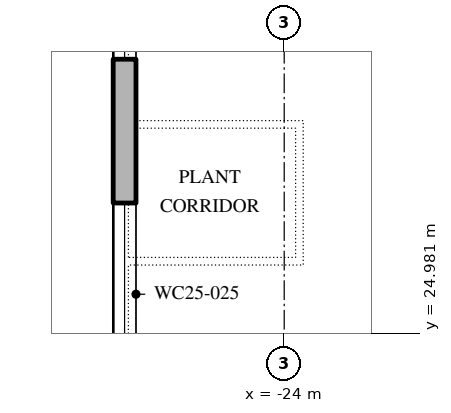
"""IFC4 building model, lengths in metres.
Left out: names, types, materials, properties, quantities, classifications, styles, units other than length and angle.
Written with IfcOpenShell. Run it as: python <this file> out.ifc"""

import sys

from ifc_helpers import new_model, si_unit, direction, frame, frame_2d, origin, place, context, subcontext, project, spatial, polyline, rectangle, outline, extrude, element, fill, save


model = new_model("IFC4")
c1 = context("Model", 3, precision=1e-05, world=origin(), true_north=direction((0.0, 1.0)))
c2 = subcontext(c1, "Body", "Model", "MODEL_VIEW")
j1 = project(units=[si_unit("LENGTHUNIT", "METRE"), si_unit("PLANEANGLEUNIT", "RADIAN")], contexts=[c1])
p1 = place(None, origin())
s1 = spatial("IfcSite", under=j1, at=p1, CompositionType="ELEMENT")
p2 = place(p1, origin())
s2 = spatial("IfcBuilding", under=s1, at=p2, CompositionType="ELEMENT")
p3 = place(p2, frame((0.0, 0.0, 373.2)))
s3 = spatial("IfcBuildingStorey", under=s2, at=p3, CompositionType="ELEMENT", Elevation=373.2)
p4 = place(p3, frame((-26.1, 31.933, 0.0), z_axis=(0.0, 0.0, 1.0), x_axis=(0.0, -1.0, 0.0)))
e1 = element("IfcWall", 1, at=p4, inside=s3, PredefinedType="STANDARD", context=c2, shape_type="SweptSolid", body=[
    extrude(rectangle(XDim=8.583, YDim=0.3, at=frame_2d((4.292, 0.0))), origin(), (0.0, 0.0, 1.0), 4.0),
])
p5 = place(p4, frame((0.946, 0.0, 0.8)))
e2 = element("IfcOpeningElement", 2, at=p5, cuts=e1, PredefinedType="OPENING", context=c2, shape_type="SweptSolid", body=[
    extrude(outline(polyline([(0.0, 0.0), (2.4, 0.0), (2.4, 1.25), (2.377, 1.488), (2.31, 1.717), (2.2, 1.929), (2.051, 2.116), (1.87, 2.272), (1.663, 2.391), (1.437, 2.468), (1.2, 2.5), (0.963, 2.468), (0.737, 2.391), (0.53, 2.272), (0.349, 2.116), (0.2, 1.929), (0.09, 1.717), (0.023, 1.488), (0.0, 1.25), (0.0, 0.0)])), frame((0.0, 0.16, 0.0), z_axis=(0.0, -1.0, 0.0), x_axis=(1.0, 0.0, 0.0)), (0.0, 0.0, 1.0), 0.32),
])
p6 = place(p4, frame((5.238, 0.0, 0.8)))
e3 = element("IfcOpeningElement", 3, at=p6, cuts=e1, PredefinedType="OPENING", context=c2, shape_type="SweptSolid", body=[
    extrude(outline(polyline([(0.0, 0.0), (2.4, 0.0), (2.4, 1.25), (2.377, 1.488), (2.31, 1.717), (2.2, 1.929), (2.051, 2.116), (1.87, 2.272), (1.663, 2.391), (1.437, 2.468), (1.2, 2.5), (0.963, 2.468), (0.737, 2.391), (0.53, 2.272), (0.349, 2.116), (0.2, 1.929), (0.09, 1.717), (0.023, 1.488), (0.0, 1.25), (0.0, 0.0)])), frame((0.0, 0.16, 0.0), z_axis=(0.0, -1.0, 0.0), x_axis=(1.0, 0.0, 0.0)), (0.0, 0.0, 1.0), 0.32),
])
p7 = place(p5, origin())
e4 = element("IfcWindow", 4, at=p7, inside=s3, PartitioningType="DOUBLE_PANEL_VERTICAL", PredefinedType="WINDOW", context=c2, shape_type="SweptSolid", body=[
    extrude(outline(polyline([(0.0, 0.0), (2.4, 0.0), (2.4, 1.25), (2.377, 1.488), (2.31, 1.717), (2.2, 1.929), (2.051, 2.116), (1.87, 2.272), (1.663, 2.391), (1.437, 2.468), (1.2, 2.5), (0.963, 2.468), (0.737, 2.391), (0.53, 2.272), (0.349, 2.116), (0.2, 1.929), (0.09, 1.717), (0.023, 1.488), (0.0, 1.25), (0.0, 0.0)])), frame((0.0, 0.03, 0.0), z_axis=(0.0, -1.0, 0.0), x_axis=(1.0, 0.0, 0.0)), (0.0, 0.0, 1.0), 0.06),
])
fill(e2, e4)
p8 = place(p6, origin())
e5 = element("IfcWindow", 5, at=p8, inside=s3, PartitioningType="DOUBLE_PANEL_VERTICAL", PredefinedType="WINDOW", context=c2, shape_type="SweptSolid", body=[
    extrude(outline(polyline([(0.0, 0.0), (2.4, 0.0), (2.4, 1.25), (2.377, 1.488), (2.31, 1.717), (2.2, 1.929), (2.051, 2.116), (1.87, 2.272), (1.663, 2.391), (1.437, 2.468), (1.2, 2.5), (0.963, 2.468), (0.737, 2.391), (0.53, 2.272), (0.349, 2.116), (0.2, 1.929), (0.09, 1.717), (0.023, 1.488), (0.0, 1.25), (0.0, 0.0)])), frame((0.0, 0.03, 0.0), z_axis=(0.0, -1.0, 0.0), x_axis=(1.0, 0.0, 0.0)), (0.0, 0.0, 1.0), 0.06),
])
fill(e3, e5)
save(model, sys.argv[1])
